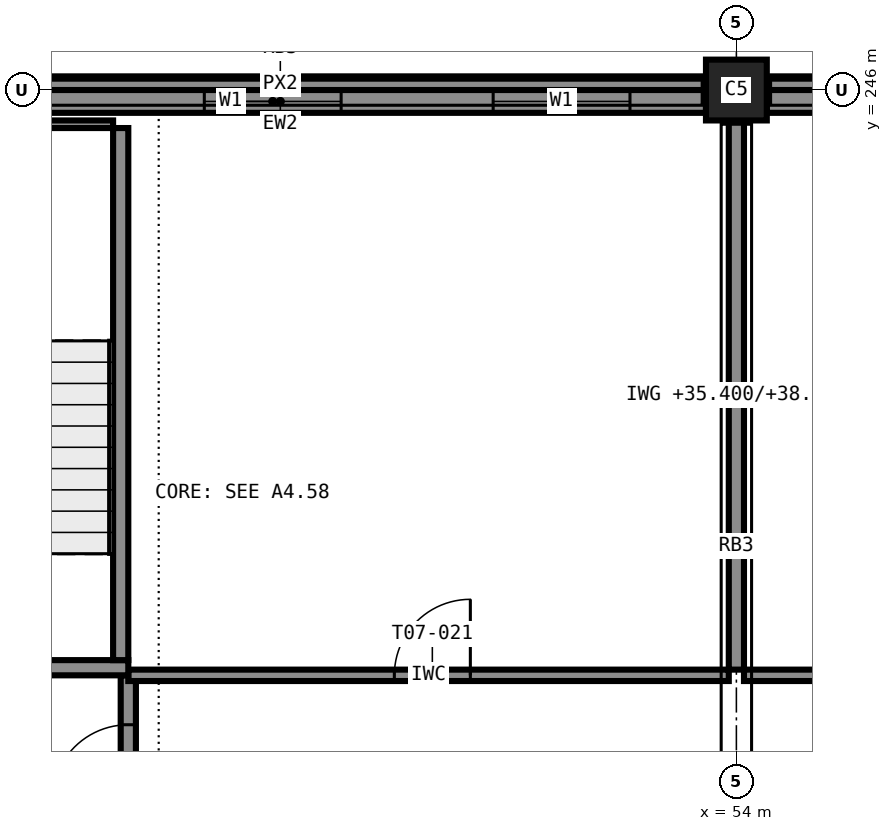
"""IFC4 building model, lengths in metres.
Left out: names, types, materials, properties, quantities, classifications, styles, units other than length and angle.
Written with IfcOpenShell. Run it as: python <this file> out.ifc"""

import sys

from ifc_helpers import new_model, si_unit, direction, frame, frame_2d, origin, origin_2d, place, context, subcontext, project, spatial, rectangle, extrude, element, fill, save


model = new_model("IFC4")
c1 = context("Model", 3, precision=1e-05, world=origin(), true_north=direction((0.0, 1.0)))
c2 = subcontext(c1, "Body", "Model", "MODEL_VIEW")
j1 = project(units=[si_unit("LENGTHUNIT", "METRE"), si_unit("PLANEANGLEUNIT", "RADIAN")], contexts=[c1])
p1 = place(None, origin())
s1 = spatial("IfcSite", under=j1, at=p1, CompositionType="ELEMENT")
p2 = place(p1, origin())
s2 = spatial("IfcBuilding", under=s1, at=p2, CompositionType="ELEMENT")
p3 = place(p2, frame((0.0, 0.0, 35.4)))
s3 = spatial("IfcBuildingStorey", under=s2, at=p3, CompositionType="ELEMENT", Elevation=35.4)
p4 = place(p3, frame((54.0, 246.0, 0.0), z_axis=(0.0, 0.0, 1.0), x_axis=(1.0, 0.0, 0.0)))
e1 = element("IfcColumn", 1, at=p4, inside=s3, PredefinedType="COLUMN", context=c2, shape_type="SweptSolid", body=[
    extrude(rectangle(XDim=0.8, YDim=0.8, at=origin_2d()), origin(), (0.0, 0.0, 1.0), 3.6),
])
p5 = place(p3, frame((42.5, 238.4, 0.0), z_axis=(0.0, 0.0, 1.0), x_axis=(1.0, 0.0, 0.0)))
e2 = element("IfcWall", 2, at=p5, inside=s3, PredefinedType="SHEAR", context=c2, shape_type="SweptSolid", body=[
    extrude(rectangle(XDim=3.5, YDim=0.2, at=frame_2d((1.75, 0.0))), origin(), (0.0, 0.0, 1.0), 3.6),
])
p6 = place(p5, frame((1.15, 0.0, 0.0)))
e3 = element("IfcOpeningElement", 3, at=p6, cuts=e2, PredefinedType="OPENING", context=c2, shape_type="SweptSolid", body=[
    extrude(rectangle(XDim=1.2, YDim=2.1, at=frame_2d((0.6, 1.05))), frame((0.0, 0.11, 0.0), z_axis=(0.0, -1.0, 0.0), x_axis=(1.0, 0.0, 0.0)), (0.0, 0.0, 1.0), 0.22),
])
p7 = place(p3, frame((45.9, 238.5, 0.0), z_axis=(0.0, 0.0, 1.0), x_axis=(0.0, 1.0, 0.0)))
e4 = element("IfcWall", 4, at=p7, inside=s3, PredefinedType="SHEAR", context=c2, shape_type="SweptSolid", body=[
    extrude(rectangle(XDim=7.0, YDim=0.2, at=frame_2d((3.5, 0.0))), origin(), (0.0, 0.0, 1.0), 3.6),
])
p8 = place(p3, frame((42.5, 245.55, 0.0), z_axis=(0.0, 0.0, 1.0), x_axis=(1.0, 0.0, 0.0)))
e5 = element("IfcWall", 5, at=p8, inside=s3, PredefinedType="SHEAR", context=c2, shape_type="SweptSolid", body=[
    extrude(rectangle(XDim=3.3, YDim=0.1, at=frame_2d((1.65, 0.0))), origin(), (0.0, 0.0, 1.0), 3.4),
])
p9 = place(p3, frame((65.6, 245.85, 0.0), z_axis=(0.0, 0.0, 1.0), x_axis=(-1.0, 0.0, 0.0)))
e6 = element("IfcWall", 6, at=p9, inside=s3, PredefinedType="STANDARD", context=c2, shape_type="SweptSolid", body=[
    extrude(rectangle(XDim=11.2, YDim=0.3, at=frame_2d((5.6, 0.0))), origin(), (0.0, 0.0, 1.0), 2.6),
])
p10 = place(p9, frame((7.5, 0.0, 0.85)))
e7 = element("IfcOpeningElement", 7, at=p10, cuts=e6, PredefinedType="OPENING", context=c2, shape_type="SweptSolid", body=[
    extrude(rectangle(XDim=1.8, YDim=1.75, at=frame_2d((0.9, 0.875))), frame((0.0, 0.16, 0.0), z_axis=(0.0, -1.0, 0.0), x_axis=(1.0, 0.0, 0.0)), (0.0, 0.0, 1.0), 0.32),
])
p11 = place(p9, frame((1.9, 0.0, 0.85)))
e8 = element("IfcOpeningElement", 8, at=p11, cuts=e6, PredefinedType="OPENING", context=c2, shape_type="SweptSolid", body=[
    extrude(rectangle(XDim=1.8, YDim=1.75, at=frame_2d((0.9, 0.875))), frame((0.0, 0.16, 0.0), z_axis=(0.0, -1.0, 0.0), x_axis=(1.0, 0.0, 0.0)), (0.0, 0.0, 1.0), 0.32),
])
p12 = place(p3, frame((53.6, 245.85, 0.0), z_axis=(0.0, 0.0, 1.0), x_axis=(-1.0, 0.0, 0.0)))
e9 = element("IfcWall", 9, at=p12, inside=s3, PredefinedType="STANDARD", context=c2, shape_type="SweptSolid", body=[
    extrude(rectangle(XDim=11.2, YDim=0.3, at=frame_2d((5.6, 0.0))), origin(), (0.0, 0.0, 1.0), 2.6),
])
p13 = place(p12, frame((1.0, 0.0, 0.85)))
e10 = element("IfcOpeningElement", 10, at=p13, cuts=e9, PredefinedType="OPENING", context=c2, shape_type="SweptSolid", body=[
    extrude(rectangle(XDim=1.8, YDim=1.75, at=frame_2d((0.9, 0.875))), frame((0.0, 0.16, 0.0), z_axis=(0.0, -1.0, 0.0), x_axis=(1.0, 0.0, 0.0)), (0.0, 0.0, 1.0), 0.32),
])
p14 = place(p12, frame((4.8, 0.0, 0.85)))
e11 = element("IfcOpeningElement", 11, at=p14, cuts=e9, PredefinedType="OPENING", context=c2, shape_type="SweptSolid", body=[
    extrude(rectangle(XDim=1.8, YDim=1.75, at=frame_2d((0.9, 0.875))), frame((0.0, 0.16, 0.0), z_axis=(0.0, -1.0, 0.0), x_axis=(1.0, 0.0, 0.0)), (0.0, 0.0, 1.0), 0.32),
])
for number, where, z_axis, x_axis in (
    (12, (65.6, 246.075, 3.4), (0.0, 0.0, 1.0), (-1.0, 0.0, 0.0)),
    (13, (53.6, 246.075, 3.4), (0.0, 0.0, 1.0), (-1.0, 0.0, 0.0)),
):
    element("IfcWall", number, at=place(p3, frame(where, z_axis=z_axis, x_axis=x_axis)), inside=s3, PredefinedType="STANDARD", context=c2, shape_type="SweptSolid", body=[
        extrude(rectangle(XDim=11.2, YDim=0.15, at=frame_2d((5.6, 0.0))), origin(), (0.0, 0.0, 1.0), 0.2),
    ])
p15 = place(p3, frame((46.0, 236.0, 0.0), z_axis=(0.0, 0.0, 1.0), x_axis=(0.0, 1.0, 0.0)))
e14 = element("IfcWall", 14, at=p15, inside=s3, PredefinedType="PARTITIONING", context=c2, shape_type="SweptSolid", body=[
    extrude(rectangle(XDim=2.3, YDim=0.2, at=frame_2d((1.15, 0.0))), origin(), (0.0, 0.0, 1.0), 3.4),
])
p16 = place(p15, frame((0.65, 0.0, 0.0)))
e15 = element("IfcOpeningElement", 15, at=p16, cuts=e14, PredefinedType="OPENING", context=c2, shape_type="SweptSolid", body=[
    extrude(rectangle(XDim=1.0, YDim=2.1, at=frame_2d((0.5, 1.05))), frame((0.0, 0.11, 0.0), z_axis=(0.0, -1.0, 0.0), x_axis=(1.0, 0.0, 0.0)), (0.0, 0.0, 1.0), 0.22),
])
p17 = place(p3, frame((46.0, 238.3, 0.0), z_axis=(0.0, 0.0, 1.0), x_axis=(1.0, 0.0, 0.0)))
e16 = element("IfcWall", 16, at=p17, inside=s3, PredefinedType="PARTITIONING", context=c2, shape_type="SweptSolid", body=[
    extrude(rectangle(XDim=7.9, YDim=0.15, at=frame_2d((3.95, 0.0))), origin(), (0.0, 0.0, 1.0), 3.4),
])
p18 = place(p17, frame((3.5, 0.0, 0.0)))
e17 = element("IfcOpeningElement", 17, at=p18, cuts=e16, PredefinedType="OPENING", context=c2, shape_type="SweptSolid", body=[
    extrude(rectangle(XDim=1.0, YDim=2.1, at=frame_2d((0.5, 1.05))), frame((0.0, 0.085, 0.0), z_axis=(0.0, -1.0, 0.0), x_axis=(1.0, 0.0, 0.0)), (0.0, 0.0, 1.0), 0.17),
])
p19 = place(p3, frame((54.1, 238.3, 0.0), z_axis=(0.0, 0.0, 1.0), x_axis=(1.0, 0.0, 0.0)))
e18 = element("IfcWall", 18, at=p19, inside=s3, PredefinedType="PARTITIONING", context=c2, shape_type="SweptSolid", body=[
    extrude(rectangle(XDim=5.8, YDim=0.15, at=frame_2d((2.9, 0.0))), origin(), (0.0, 0.0, 1.0), 3.4),
])
p20 = place(p19, frame((2.4, 0.0, 0.0)))
e19 = element("IfcOpeningElement", 19, at=p20, cuts=e18, PredefinedType="OPENING", context=c2, shape_type="SweptSolid", body=[
    extrude(rectangle(XDim=1.0, YDim=2.1, at=frame_2d((0.5, 1.05))), frame((0.0, 0.085, 0.0), z_axis=(0.0, -1.0, 0.0), x_axis=(1.0, 0.0, 0.0)), (0.0, 0.0, 1.0), 0.17),
])
p21 = place(p3, frame((54.0, 245.6, 0.0), z_axis=(0.0, 0.0, 1.0), x_axis=(0.0, -1.0, 0.0)))
e20 = element("IfcWall", 20, at=p21, inside=s3, PredefinedType="PARTITIONING", context=c2, shape_type="SweptSolid", body=[
    extrude(rectangle(XDim=7.225, YDim=0.2, at=frame_2d((3.613, 0.0))), origin(), (0.0, 0.0, 1.0), 2.6),
])
p22 = place(p13, origin())
e21 = element("IfcWindow", 21, at=p22, inside=s3, PartitioningType="SINGLE_PANEL", PredefinedType="WINDOW", context=c2, shape_type="SweptSolid", body=[
    extrude(rectangle(XDim=1.8, YDim=1.75, at=frame_2d((0.9, 0.875))), frame((0.0, 0.03, 0.0), z_axis=(0.0, -1.0, 0.0), x_axis=(1.0, 0.0, 0.0)), (0.0, 0.0, 1.0), 0.06),
])
fill(e10, e21)
p23 = place(p14, origin())
e22 = element("IfcWindow", 22, at=p23, inside=s3, PartitioningType="SINGLE_PANEL", PredefinedType="WINDOW", context=c2, shape_type="SweptSolid", body=[
    extrude(rectangle(XDim=1.8, YDim=1.75, at=frame_2d((0.9, 0.875))), frame((0.0, 0.03, 0.0), z_axis=(0.0, -1.0, 0.0), x_axis=(1.0, 0.0, 0.0)), (0.0, 0.0, 1.0), 0.06),
])
fill(e11, e22)
p24 = place(p16, origin())
e23 = element("IfcDoor", 23, at=p24, inside=s3, OperationType="SINGLE_SWING_LEFT", PredefinedType="DOOR", context=c2, shape_type="SweptSolid", body=[
    extrude(rectangle(XDim=1.0, YDim=2.1, at=frame_2d((0.5, 1.05))), frame((0.0, 0.025, 0.0), z_axis=(0.0, -1.0, 0.0), x_axis=(1.0, 0.0, 0.0)), (0.0, 0.0, 1.0), 0.05),
])
fill(e15, e23)
p25 = place(p18, origin())
e24 = element("IfcDoor", 24, at=p25, inside=s3, OperationType="SINGLE_SWING_RIGHT", PredefinedType="DOOR", context=c2, shape_type="SweptSolid", body=[
    extrude(rectangle(XDim=1.0, YDim=2.1, at=frame_2d((0.5, 1.05))), frame((0.0, 0.025, 0.0), z_axis=(0.0, -1.0, 0.0), x_axis=(1.0, 0.0, 0.0)), (0.0, 0.0, 1.0), 0.05),
])
fill(e17, e24)
save(model, sys.argv[1])
